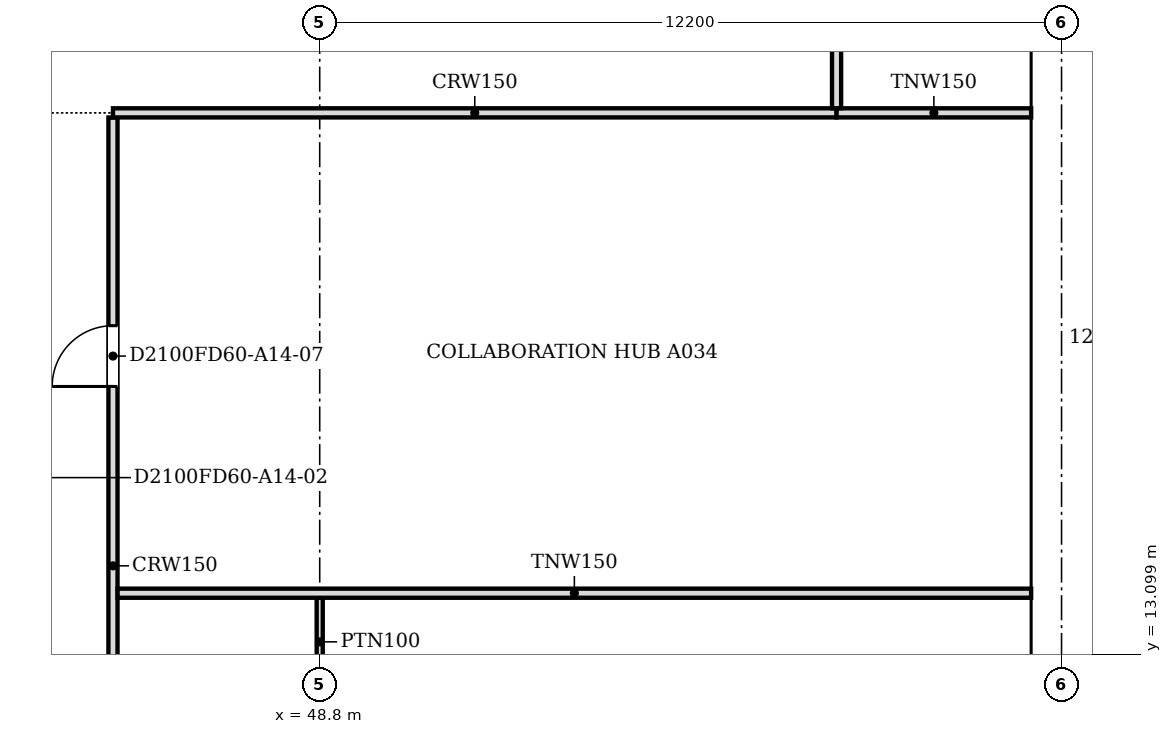
"""IFC4 building model, lengths in metres.
Left out: names, types, materials, properties, quantities, classifications, styles, units other than length and angle.
Written with IfcOpenShell. Run it as: python <this file> out.ifc"""

import sys

from ifc_helpers import new_model, si_unit, direction, frame, frame_2d, origin, place, context, subcontext, project, spatial, polyline, rectangle, outline, extrude, faceted_brep, source, transform, mapped, element, fill, save


model = new_model("IFC4")
c1 = context("Model", 3, precision=1e-05, world=origin(), true_north=direction((0.0, 1.0)))
c2 = subcontext(c1, "Body", "Model", "MODEL_VIEW")
j1 = project(units=[si_unit("LENGTHUNIT", "METRE"), si_unit("PLANEANGLEUNIT", "RADIAN")], contexts=[c1])
p1 = place(None, origin())
s1 = spatial("IfcSite", under=j1, at=p1, CompositionType="ELEMENT")
p2 = place(p1, origin())
s2 = spatial("IfcBuilding", under=s1, at=p2, CompositionType="ELEMENT")
p3 = place(p2, frame((0.0, 0.0, 155.4)))
s3 = spatial("IfcBuildingStorey", under=s2, at=p3, CompositionType="ELEMENT", Elevation=155.4)
m1 = source(origin(), c2, "Body", "SweptSolid", [
    extrude(outline(polyline([(6.1, 0.0), (3.05, 3.8), (0.0, 0.0), (6.1, 0.0)])), frame((0.0, 0.25, 0.0), z_axis=(0.0, -1.0, 0.0), x_axis=(1.0, 0.0, 0.0)), (0.0, 0.0, 1.0), 0.5),
])
p4 = place(p3, frame((60.75, 12.2, 0.0), z_axis=(0.0, 0.0, 1.0), x_axis=(0.0, 1.0, 0.0)))
e1 = element("IfcWall", 1, at=p4, inside=s3, PredefinedType="SOLIDWALL", context=c2, shape_type="MappedRepresentation", body=[
    mapped(m1, transform((0.0, 0.0, 0.0), scale=1.0)),
])
m2 = source(origin(), c2, "Body", "SweptSolid", [
    extrude(outline(polyline([(5.579, 0.25), (3.05, 3.401), (0.521, 0.25), (5.579, 0.25)])), frame((0.0, 0.26, 0.0), z_axis=(0.0, -1.0, 0.0), x_axis=(1.0, 0.0, 0.0)), (0.0, 0.0, 1.0), 0.52),
])
p5 = place(p4, origin())
e2 = element("IfcOpeningElement", 2, at=p5, cuts=e1, PredefinedType="OPENING", context=c2, shape_type="MappedRepresentation", body=[
    mapped(m2, transform((0.0, 0.0, 0.0), scale=1.0)),
])
m3 = source(origin(), c2, "Body", "Brep", [
    faceted_brep([(6.1, -0.25, 0.0), (3.05, -0.25, 3.8), (0.0, -0.25, 0.0), (6.1, -0.25, 0.0), (0.0, 0.25, 0.0), (3.05, 0.25, 3.8), (6.1, 0.25, 0.0), (6.1, 0.25, 0.0)], [[[0, 1, 2, 3]], [[4, 5, 6, 7]], [[6, 5, 1, 0]], [[5, 4, 2, 1]], [[4, 7, 3, 2]], [[3, 7, 6, 0]]]),
])
p6 = place(p3, frame((60.75, 18.3, 0.0), z_axis=(0.0, 0.0, 1.0), x_axis=(0.0, 1.0, 0.0)))
e3 = element("IfcWall", 3, at=p6, inside=s3, PredefinedType="SOLIDWALL", context=c2, shape_type="MappedRepresentation", body=[
    mapped(m3, transform((0.0, 0.0, 0.0), scale=1.0)),
])
p7 = place(p6, origin())
e4 = element("IfcOpeningElement", 4, at=p7, cuts=e3, PredefinedType="OPENING", context=c2, shape_type="MappedRepresentation", body=[
    mapped(m2, transform((0.0, 0.0, 0.0), scale=1.0)),
])
p8 = place(p2, frame((0.0, 0.0, 159.2)))
s4 = spatial("IfcBuildingStorey", under=s2, at=p8, CompositionType="ELEMENT", Elevation=159.2)
m4 = source(origin(), c2, "Body", "SweptSolid", [
    extrude(outline(polyline([(3.05, 0.0), (6.1, 3.8), (3.05, 7.6), (0.0, 3.8), (3.05, 0.0)])), frame((0.0, 0.25, 0.0), z_axis=(0.0, -1.0, 0.0), x_axis=(1.0, 0.0, 0.0)), (0.0, 0.0, 1.0), 0.5),
])
p9 = place(p8, frame((60.75, 9.15, -3.8), z_axis=(0.0, 0.0, 1.0), x_axis=(0.0, 1.0, 0.0)))
e5 = element("IfcWall", 5, at=p9, inside=s4, PredefinedType="SOLIDWALL", context=c2, shape_type="MappedRepresentation", body=[
    mapped(m4, transform((0.0, 0.0, 0.0), scale=1.0)),
])
m5 = source(origin(), c2, "Body", "SweptSolid", [
    extrude(outline(polyline([(3.05, 0.399), (5.78, 3.8), (3.05, 7.201), (0.321, 3.8), (3.05, 0.399)])), frame((0.0, 0.26, 0.0), z_axis=(0.0, -1.0, 0.0), x_axis=(1.0, 0.0, 0.0)), (0.0, 0.0, 1.0), 0.52),
])
p10 = place(p9, origin())
e6 = element("IfcOpeningElement", 6, at=p10, cuts=e5, PredefinedType="OPENING", context=c2, shape_type="MappedRepresentation", body=[
    mapped(m5, transform((0.0, 0.0, 0.0), scale=1.0)),
])
p11 = place(p8, frame((60.75, 15.25, -3.8), z_axis=(0.0, 0.0, 1.0), x_axis=(0.0, 1.0, 0.0)))
e7 = element("IfcWall", 7, at=p11, inside=s4, PredefinedType="SOLIDWALL", context=c2, shape_type="MappedRepresentation", body=[
    mapped(m4, transform((0.0, 0.0, 0.0), scale=1.0)),
])
p12 = place(p11, origin())
e8 = element("IfcOpeningElement", 8, at=p12, cuts=e7, PredefinedType="OPENING", context=c2, shape_type="MappedRepresentation", body=[
    mapped(m5, transform((0.0, 0.0, 0.0), scale=1.0)),
])
m6 = source(origin(), c2, "Body", "Brep", [
    faceted_brep([(3.05, -0.25, 0.0), (6.1, -0.25, 3.8), (6.1, -0.25, 3.8), (3.05, -0.25, 7.6), (0.0, -0.25, 3.8), (0.0, 0.25, 3.8), (3.05, 0.25, 7.6), (6.1, 0.25, 3.8), (6.1, 0.25, 3.8), (3.05, 0.25, 0.0)], [[[0, 1, 2, 3, 4]], [[5, 6, 7, 8, 9]], [[9, 8, 1, 0]], [[7, 6, 3, 2]], [[6, 5, 4, 3]], [[5, 9, 0, 4]], [[1, 8, 7, 2]]]),
])
p13 = place(p8, frame((60.75, 21.35, -3.8), z_axis=(0.0, 0.0, 1.0), x_axis=(0.0, 1.0, 0.0)))
e9 = element("IfcWall", 9, at=p13, inside=s4, PredefinedType="SOLIDWALL", context=c2, shape_type="MappedRepresentation", body=[
    mapped(m6, transform((0.0, 0.0, 0.0), scale=1.0)),
])
p14 = place(p13, origin())
e10 = element("IfcOpeningElement", 10, at=p14, cuts=e9, PredefinedType="OPENING", context=c2, shape_type="MappedRepresentation", body=[
    mapped(m5, transform((0.0, 0.0, 0.0), scale=1.0)),
])
p15 = place(p3, frame((45.4, 21.924, 0.0), z_axis=(0.0, 0.0, 1.0), x_axis=(0.0, -1.0, 0.0)))
e11 = element("IfcWall", 11, at=p15, inside=s3, PredefinedType="PARTITIONING", context=c2, shape_type="SweptSolid", body=[
    extrude(rectangle(XDim=13.824, YDim=0.15, at=frame_2d((6.912, 0.0))), origin(), (0.0, 0.0, 1.0), 3.067),
])
m7 = source(origin(), c2, "Body", "SweptSolid", [
    extrude(rectangle(XDim=1.0, YDim=2.1, at=frame_2d((0.5, 1.05))), frame((0.0, 0.085, 0.0), z_axis=(0.0, -1.0, 0.0), x_axis=(1.0, 0.0, 0.0)), (0.0, 0.0, 1.0), 0.17),
])
p16 = place(p15, frame((10.324, 0.0, 0.0)))
e12 = element("IfcOpeningElement", 12, at=p16, cuts=e11, PredefinedType="OPENING", context=c2, shape_type="MappedRepresentation", body=[
    mapped(m7, transform((0.0, 0.0, 0.0), scale=1.0)),
])
p17 = place(p15, frame((3.424, 0.0, 0.0)))
e13 = element("IfcOpeningElement", 13, at=p17, cuts=e11, PredefinedType="OPENING", context=c2, shape_type="MappedRepresentation", body=[
    mapped(m7, transform((0.0, 0.0, 0.0), scale=1.0)),
])
p18 = place(p3, frame((48.8, 12.575, 0.0), z_axis=(0.0, 0.0, 1.0), x_axis=(0.0, 1.0, 0.0)))
e14 = element("IfcWall", 14, at=p18, inside=s3, PredefinedType="PARTITIONING", context=c2, shape_type="SweptSolid", body=[
    extrude(rectangle(XDim=1.45, YDim=0.1, at=frame_2d((0.725, 0.0))), origin(), (0.0, 0.0, 1.0), 3.067),
])
p19 = place(p3, frame((45.476, 14.1, 0.0), z_axis=(0.0, 0.0, 1.0), x_axis=(1.0, 0.0, 0.0)))
e15 = element("IfcWall", 15, at=p19, inside=s3, PredefinedType="PARTITIONING", context=c2, shape_type="SweptSolid", body=[
    extrude(rectangle(XDim=15.024, YDim=0.15, at=frame_2d((7.512, 0.0))), origin(), (0.0, 0.0, 1.0), 3.067),
])
p20 = place(p3, frame((45.4, 22.0, 0.0), z_axis=(0.0, 0.0, 1.0), x_axis=(1.0, 0.0, 0.0)))
e16 = element("IfcWall", 16, at=p20, inside=s3, PredefinedType="PARTITIONING", context=c2, shape_type="SweptSolid", body=[
    extrude(rectangle(XDim=11.9, YDim=0.15, at=frame_2d((5.95, 0.0))), origin(), (0.0, 0.0, 1.0), 3.067),
])
p21 = place(p3, frame((57.301, 22.0, 0.0), z_axis=(0.0, 0.0, 1.0), x_axis=(1.0, 0.0, 0.0)))
e17 = element("IfcWall", 17, at=p21, inside=s3, PredefinedType="PARTITIONING", context=c2, shape_type="SweptSolid", body=[
    extrude(rectangle(XDim=3.199, YDim=0.15, at=frame_2d((1.6, 0.0))), origin(), (0.0, 0.0, 1.0), 3.067),
])
p22 = place(p3, frame((57.3, 30.6, 0.0), z_axis=(0.0, 0.0, 1.0), x_axis=(0.0, -1.0, 0.0)))
e18 = element("IfcWall", 18, at=p22, inside=s3, PredefinedType="PARTITIONING", context=c2, shape_type="SweptSolid", body=[
    extrude(rectangle(XDim=8.524, YDim=0.15, at=frame_2d((4.262, 0.0))), origin(), (0.0, 0.0, 1.0), 3.067),
])
m8 = source(origin(), c2, "Body", "SweptSolid", [
    extrude(rectangle(XDim=0.9, YDim=2.1, at=frame_2d((0.45, 1.05))), frame((0.0, 0.085, 0.0), z_axis=(0.0, -1.0, 0.0), x_axis=(1.0, 0.0, 0.0)), (0.0, 0.0, 1.0), 0.17),
])
p23 = place(p22, frame((3.824, 0.0, 0.0)))
e19 = element("IfcOpeningElement", 19, at=p23, cuts=e18, PredefinedType="OPENING", context=c2, shape_type="MappedRepresentation", body=[
    mapped(m8, transform((0.0, 0.0, 0.0), scale=1.0)),
])
m9 = source(origin(), c2, "Body", "SweptSolid", [
    extrude(rectangle(XDim=1.0, YDim=2.1, at=frame_2d((0.5, 1.05))), frame((0.0, 0.025, 0.0), z_axis=(0.0, -1.0, 0.0), x_axis=(1.0, 0.0, 0.0)), (0.0, 0.0, 1.0), 0.05),
])
p24 = place(p17, origin())
e20 = element("IfcDoor", 20, at=p24, inside=s3, OperationType="SINGLE_SWING_RIGHT", PredefinedType="DOOR", context=c2, shape_type="MappedRepresentation", body=[
    mapped(m9, transform((0.0, 0.0, 0.0), scale=1.0)),
])
fill(e13, e20)
save(model, sys.argv[1])
